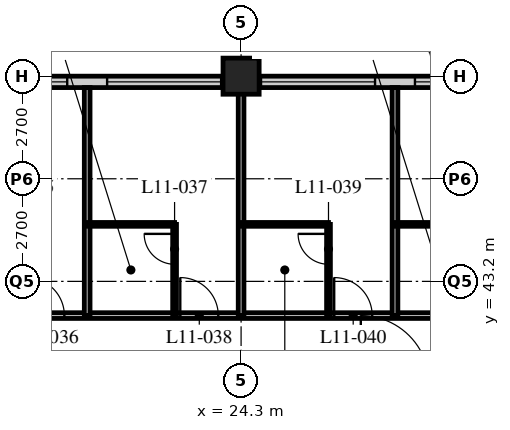
"""IFC4 building model, lengths in metres.
Left out: names, types, materials, properties, quantities, classifications, styles, units other than length and angle.
Written with IfcOpenShell. Run it as: python <this file> out.ifc"""

import sys

from ifc_helpers import new_model, si_unit, direction, frame, frame_2d, origin, origin_2d, place, context, subcontext, project, spatial, rectangle, hollow_rectangle, extrude, element, fill, save


model = new_model("IFC4")
c1 = context("Model", 3, precision=1e-05, world=origin(), true_north=direction((0.0, 1.0)))
c2 = subcontext(c1, "Body", "Model", "MODEL_VIEW")
j1 = project(units=[si_unit("LENGTHUNIT", "METRE"), si_unit("PLANEANGLEUNIT", "RADIAN")], contexts=[c1])
p1 = place(None, origin())
s1 = spatial("IfcSite", under=j1, at=p1, CompositionType="ELEMENT")
p2 = place(p1, origin())
s2 = spatial("IfcBuilding", under=s1, at=p2, CompositionType="ELEMENT")
p3 = place(p2, frame((0.0, 0.0, 50.0)))
s3 = spatial("IfcBuildingStorey", under=s2, at=p3, CompositionType="ELEMENT", Elevation=50.0)
p4 = place(p3, frame((24.3, 48.6, 0.0), z_axis=(0.0, 0.0, 1.0), x_axis=(1.0, 0.0, 0.0)))
e1 = element("IfcColumn", 1, at=p4, inside=s3, PredefinedType="COLUMN", context=c2, shape_type="SweptSolid", body=[
    extrude(hollow_rectangle(XDim=0.95, YDim=0.95, WallThickness=0.095, at=origin_2d()), origin(), (0.0, 0.0, 1.0), 3.4),
])
p5 = place(p3, frame((48.3, 48.45, 0.0), z_axis=(0.0, 0.0, 1.0), x_axis=(-1.0, 0.0, 0.0)))
e2 = element("IfcWall", 2, at=p5, inside=s3, PredefinedType="SOLIDWALL", context=c2, shape_type="SweptSolid", body=[
    extrude(rectangle(XDim=40.2, YDim=0.3, at=frame_2d((20.1, 0.0))), origin(), (0.0, 0.0, 1.0), 3.19),
])
p6 = place(p5, frame((0.225, 0.0, 0.9)))
e3 = element("IfcOpeningElement", 3, at=p6, cuts=e2, PredefinedType="OPENING", context=c2, shape_type="SweptSolid", body=[
    extrude(rectangle(XDim=3.0, YDim=2.0, at=frame_2d((1.5, 1.0))), frame((0.0, 0.16, 0.0), z_axis=(0.0, -1.0, 0.0), x_axis=(1.0, 0.0, 0.0)), (0.0, 0.0, 1.0), 0.32),
])
p7 = place(p5, frame((4.275, 0.0, 0.9)))
e4 = element("IfcOpeningElement", 4, at=p7, cuts=e2, PredefinedType="OPENING", context=c2, shape_type="SweptSolid", body=[
    extrude(rectangle(XDim=3.0, YDim=2.0, at=frame_2d((1.5, 1.0))), frame((0.0, 0.16, 0.0), z_axis=(0.0, -1.0, 0.0), x_axis=(1.0, 0.0, 0.0)), (0.0, 0.0, 1.0), 0.32),
])
p8 = place(p5, frame((8.325, 0.0, 0.9)))
e5 = element("IfcOpeningElement", 5, at=p8, cuts=e2, PredefinedType="OPENING", context=c2, shape_type="SweptSolid", body=[
    extrude(rectangle(XDim=3.0, YDim=2.0, at=frame_2d((1.5, 1.0))), frame((0.0, 0.16, 0.0), z_axis=(0.0, -1.0, 0.0), x_axis=(1.0, 0.0, 0.0)), (0.0, 0.0, 1.0), 0.32),
])
p9 = place(p5, frame((12.375, 0.0, 0.9)))
e6 = element("IfcOpeningElement", 6, at=p9, cuts=e2, PredefinedType="OPENING", context=c2, shape_type="SweptSolid", body=[
    extrude(rectangle(XDim=3.0, YDim=2.0, at=frame_2d((1.5, 1.0))), frame((0.0, 0.16, 0.0), z_axis=(0.0, -1.0, 0.0), x_axis=(1.0, 0.0, 0.0)), (0.0, 0.0, 1.0), 0.32),
])
p10 = place(p5, frame((16.425, 0.0, 0.9)))
e7 = element("IfcOpeningElement", 7, at=p10, cuts=e2, PredefinedType="OPENING", context=c2, shape_type="SweptSolid", body=[
    extrude(rectangle(XDim=3.0, YDim=2.0, at=frame_2d((1.5, 1.0))), frame((0.0, 0.16, 0.0), z_axis=(0.0, -1.0, 0.0), x_axis=(1.0, 0.0, 0.0)), (0.0, 0.0, 1.0), 0.32),
])
p11 = place(p5, frame((20.475, 0.0, 0.9)))
e8 = element("IfcOpeningElement", 8, at=p11, cuts=e2, PredefinedType="OPENING", context=c2, shape_type="SweptSolid", body=[
    extrude(rectangle(XDim=3.0, YDim=2.0, at=frame_2d((1.5, 1.0))), frame((0.0, 0.16, 0.0), z_axis=(0.0, -1.0, 0.0), x_axis=(1.0, 0.0, 0.0)), (0.0, 0.0, 1.0), 0.32),
])
p12 = place(p5, frame((24.525, 0.0, 0.9)))
e9 = element("IfcOpeningElement", 9, at=p12, cuts=e2, PredefinedType="OPENING", context=c2, shape_type="SweptSolid", body=[
    extrude(rectangle(XDim=3.0, YDim=2.0, at=frame_2d((1.5, 1.0))), frame((0.0, 0.16, 0.0), z_axis=(0.0, -1.0, 0.0), x_axis=(1.0, 0.0, 0.0)), (0.0, 0.0, 1.0), 0.32),
])
p13 = place(p5, frame((28.575, 0.0, 0.9)))
e10 = element("IfcOpeningElement", 10, at=p13, cuts=e2, PredefinedType="OPENING", context=c2, shape_type="SweptSolid", body=[
    extrude(rectangle(XDim=3.0, YDim=2.0, at=frame_2d((1.5, 1.0))), frame((0.0, 0.16, 0.0), z_axis=(0.0, -1.0, 0.0), x_axis=(1.0, 0.0, 0.0)), (0.0, 0.0, 1.0), 0.32),
])
p14 = place(p5, frame((32.625, 0.0, 0.9)))
e11 = element("IfcOpeningElement", 11, at=p14, cuts=e2, PredefinedType="OPENING", context=c2, shape_type="SweptSolid", body=[
    extrude(rectangle(XDim=3.0, YDim=2.0, at=frame_2d((1.5, 1.0))), frame((0.0, 0.16, 0.0), z_axis=(0.0, -1.0, 0.0), x_axis=(1.0, 0.0, 0.0)), (0.0, 0.0, 1.0), 0.32),
])
p15 = place(p5, frame((36.675, 0.0, 0.9)))
e12 = element("IfcOpeningElement", 12, at=p15, cuts=e2, PredefinedType="OPENING", context=c2, shape_type="SweptSolid", body=[
    extrude(rectangle(XDim=3.0, YDim=2.0, at=frame_2d((1.5, 1.0))), frame((0.0, 0.16, 0.0), z_axis=(0.0, -1.0, 0.0), x_axis=(1.0, 0.0, 0.0)), (0.0, 0.0, 1.0), 0.32),
])
p16 = place(p3, frame((8.1, 42.3, 0.0), z_axis=(0.0, 0.0, 1.0), x_axis=(1.0, 0.0, 0.0)))
e13 = element("IfcWall", 13, at=p16, inside=s3, PredefinedType="PARTITIONING", context=c2, shape_type="SweptSolid", body=[
    extrude(rectangle(XDim=40.5, YDim=0.15, at=frame_2d((20.25, 0.0))), origin(), (0.0, 0.0, 1.0), 3.19),
])
p17 = place(p16, frame((6.5, 0.0, 0.0)))
e14 = element("IfcOpeningElement", 14, at=p17, cuts=e13, PredefinedType="OPENING", context=c2, shape_type="SweptSolid", body=[
    extrude(rectangle(XDim=1.0, YDim=2.1, at=frame_2d((0.5, 1.05))), frame((0.0, 0.085, 0.0), z_axis=(0.0, -1.0, 0.0), x_axis=(1.0, 0.0, 0.0)), (0.0, 0.0, 1.0), 0.17),
])
p18 = place(p16, frame((10.55, 0.0, 0.0)))
e15 = element("IfcOpeningElement", 15, at=p18, cuts=e13, PredefinedType="OPENING", context=c2, shape_type="SweptSolid", body=[
    extrude(rectangle(XDim=1.0, YDim=2.1, at=frame_2d((0.5, 1.05))), frame((0.0, 0.085, 0.0), z_axis=(0.0, -1.0, 0.0), x_axis=(1.0, 0.0, 0.0)), (0.0, 0.0, 1.0), 0.17),
])
p19 = place(p16, frame((14.6, 0.0, 0.0)))
e16 = element("IfcOpeningElement", 16, at=p19, cuts=e13, PredefinedType="OPENING", context=c2, shape_type="SweptSolid", body=[
    extrude(rectangle(XDim=1.0, YDim=2.1, at=frame_2d((0.5, 1.05))), frame((0.0, 0.085, 0.0), z_axis=(0.0, -1.0, 0.0), x_axis=(1.0, 0.0, 0.0)), (0.0, 0.0, 1.0), 0.17),
])
p20 = place(p16, frame((18.65, 0.0, 0.0)))
e17 = element("IfcOpeningElement", 17, at=p20, cuts=e13, PredefinedType="OPENING", context=c2, shape_type="SweptSolid", body=[
    extrude(rectangle(XDim=1.0, YDim=2.1, at=frame_2d((0.5, 1.05))), frame((0.0, 0.085, 0.0), z_axis=(0.0, -1.0, 0.0), x_axis=(1.0, 0.0, 0.0)), (0.0, 0.0, 1.0), 0.17),
])
p21 = place(p16, frame((22.7, 0.0, 0.0)))
e18 = element("IfcOpeningElement", 18, at=p21, cuts=e13, PredefinedType="OPENING", context=c2, shape_type="SweptSolid", body=[
    extrude(rectangle(XDim=1.0, YDim=2.1, at=frame_2d((0.5, 1.05))), frame((0.0, 0.085, 0.0), z_axis=(0.0, -1.0, 0.0), x_axis=(1.0, 0.0, 0.0)), (0.0, 0.0, 1.0), 0.17),
])
p22 = place(p16, frame((26.75, 0.0, 0.0)))
e19 = element("IfcOpeningElement", 19, at=p22, cuts=e13, PredefinedType="OPENING", context=c2, shape_type="SweptSolid", body=[
    extrude(rectangle(XDim=1.0, YDim=2.1, at=frame_2d((0.5, 1.05))), frame((0.0, 0.085, 0.0), z_axis=(0.0, -1.0, 0.0), x_axis=(1.0, 0.0, 0.0)), (0.0, 0.0, 1.0), 0.17),
])
p23 = place(p16, frame((30.8, 0.0, 0.0)))
e20 = element("IfcOpeningElement", 20, at=p23, cuts=e13, PredefinedType="OPENING", context=c2, shape_type="SweptSolid", body=[
    extrude(rectangle(XDim=1.0, YDim=2.1, at=frame_2d((0.5, 1.05))), frame((0.0, 0.085, 0.0), z_axis=(0.0, -1.0, 0.0), x_axis=(1.0, 0.0, 0.0)), (0.0, 0.0, 1.0), 0.17),
])
p24 = place(p16, frame((34.85, 0.0, 0.0)))
e21 = element("IfcOpeningElement", 21, at=p24, cuts=e13, PredefinedType="OPENING", context=c2, shape_type="SweptSolid", body=[
    extrude(rectangle(XDim=1.0, YDim=2.1, at=frame_2d((0.5, 1.05))), frame((0.0, 0.085, 0.0), z_axis=(0.0, -1.0, 0.0), x_axis=(1.0, 0.0, 0.0)), (0.0, 0.0, 1.0), 0.17),
])
p25 = place(p16, frame((36.875, 0.0, 0.0)))
e22 = element("IfcOpeningElement", 22, at=p25, cuts=e13, PredefinedType="OPENING", context=c2, shape_type="SweptSolid", body=[
    extrude(rectangle(XDim=1.0, YDim=2.1, at=frame_2d((0.5, 1.05))), frame((0.0, 0.085, 0.0), z_axis=(0.0, -1.0, 0.0), x_axis=(1.0, 0.0, 0.0)), (0.0, 0.0, 1.0), 0.17),
])
p26 = place(p16, frame((2.625, 0.0, 0.0)))
e23 = element("IfcOpeningElement", 23, at=p26, cuts=e13, PredefinedType="OPENING", context=c2, shape_type="SweptSolid", body=[
    extrude(rectangle(XDim=1.0, YDim=2.1, at=frame_2d((0.5, 1.05))), frame((0.0, 0.085, 0.0), z_axis=(0.0, -1.0, 0.0), x_axis=(1.0, 0.0, 0.0)), (0.0, 0.0, 1.0), 0.17),
])
p27 = place(p3, frame((20.25, 42.3, 0.0), z_axis=(0.0, 0.0, 1.0), x_axis=(0.0, 1.0, 0.0)))
e24 = element("IfcWall", 24, at=p27, inside=s3, PredefinedType="PARTITIONING", context=c2, shape_type="SweptSolid", body=[
    extrude(rectangle(XDim=6.0, YDim=0.15, at=frame_2d((3.0, 0.0))), origin(), (0.0, 0.0, 1.0), 3.19),
])
p28 = place(p3, frame((20.25, 44.7, 0.0), z_axis=(0.0, 0.0, 1.0), x_axis=(1.0, 0.0, 0.0)))
e25 = element("IfcWall", 25, at=p28, inside=s3, PredefinedType="PARTITIONING", context=c2, shape_type="SweptSolid", body=[
    extrude(rectangle(XDim=2.3, YDim=0.1, at=frame_2d((1.15, 0.0))), origin(), (0.0, 0.0, 1.0), 3.19),
])
p29 = place(p3, frame((22.55, 42.3, 0.0), z_axis=(0.0, 0.0, 1.0), x_axis=(0.0, 1.0, 0.0)))
e26 = element("IfcWall", 26, at=p29, inside=s3, PredefinedType="PARTITIONING", context=c2, shape_type="SweptSolid", body=[
    extrude(rectangle(XDim=2.4, YDim=0.1, at=frame_2d((1.2, 0.0))), origin(), (0.0, 0.0, 1.0), 3.19),
])
p30 = place(p29, frame((1.35, 0.0, 0.0)))
e27 = element("IfcOpeningElement", 27, at=p30, cuts=e26, PredefinedType="OPENING", context=c2, shape_type="SweptSolid", body=[
    extrude(rectangle(XDim=0.8, YDim=2.1, at=frame_2d((0.4, 1.05))), frame((0.0, 0.06, 0.0), z_axis=(0.0, -1.0, 0.0), x_axis=(1.0, 0.0, 0.0)), (0.0, 0.0, 1.0), 0.12),
])
p31 = place(p3, frame((24.3, 42.3, 0.0), z_axis=(0.0, 0.0, 1.0), x_axis=(0.0, 1.0, 0.0)))
e28 = element("IfcWall", 28, at=p31, inside=s3, PredefinedType="PARTITIONING", context=c2, shape_type="SweptSolid", body=[
    extrude(rectangle(XDim=6.0, YDim=0.15, at=frame_2d((3.0, 0.0))), origin(), (0.0, 0.0, 1.0), 2.578),
])
p32 = place(p3, frame((24.3, 44.7, 0.0), z_axis=(0.0, 0.0, 1.0), x_axis=(1.0, 0.0, 0.0)))
e29 = element("IfcWall", 29, at=p32, inside=s3, PredefinedType="PARTITIONING", context=c2, shape_type="SweptSolid", body=[
    extrude(rectangle(XDim=2.3, YDim=0.1, at=frame_2d((1.15, 0.0))), origin(), (0.0, 0.0, 1.0), 3.19),
])
p33 = place(p3, frame((26.6, 42.3, 0.0), z_axis=(0.0, 0.0, 1.0), x_axis=(0.0, 1.0, 0.0)))
e30 = element("IfcWall", 30, at=p33, inside=s3, PredefinedType="PARTITIONING", context=c2, shape_type="SweptSolid", body=[
    extrude(rectangle(XDim=2.4, YDim=0.1, at=frame_2d((1.2, 0.0))), origin(), (0.0, 0.0, 1.0), 3.19),
])
p34 = place(p33, frame((1.35, 0.0, 0.0)))
e31 = element("IfcOpeningElement", 31, at=p34, cuts=e30, PredefinedType="OPENING", context=c2, shape_type="SweptSolid", body=[
    extrude(rectangle(XDim=0.8, YDim=2.1, at=frame_2d((0.4, 1.05))), frame((0.0, 0.06, 0.0), z_axis=(0.0, -1.0, 0.0), x_axis=(1.0, 0.0, 0.0)), (0.0, 0.0, 1.0), 0.12),
])
p35 = place(p3, frame((28.35, 42.3, 0.0), z_axis=(0.0, 0.0, 1.0), x_axis=(0.0, 1.0, 0.0)))
e32 = element("IfcWall", 32, at=p35, inside=s3, PredefinedType="PARTITIONING", context=c2, shape_type="SweptSolid", body=[
    extrude(rectangle(XDim=6.0, YDim=0.15, at=frame_2d((3.0, 0.0))), origin(), (0.0, 0.0, 1.0), 3.19),
])
p36 = place(p3, frame((28.35, 44.7, 0.0), z_axis=(0.0, 0.0, 1.0), x_axis=(1.0, 0.0, 0.0)))
e33 = element("IfcWall", 33, at=p36, inside=s3, PredefinedType="PARTITIONING", context=c2, shape_type="SweptSolid", body=[
    extrude(rectangle(XDim=2.3, YDim=0.1, at=frame_2d((1.15, 0.0))), origin(), (0.0, 0.0, 1.0), 3.19),
])
p37 = place(p10, origin())
e34 = element("IfcWindow", 34, at=p37, inside=s3, PartitioningType="SINGLE_PANEL", PredefinedType="WINDOW", context=c2, shape_type="SweptSolid", body=[
    extrude(rectangle(XDim=3.0, YDim=2.0, at=frame_2d((1.5, 1.0))), frame((0.0, 0.03, 0.0), z_axis=(0.0, -1.0, 0.0), x_axis=(1.0, 0.0, 0.0)), (0.0, 0.0, 1.0), 0.06),
])
fill(e7, e34)
p38 = place(p11, origin())
e35 = element("IfcWindow", 35, at=p38, inside=s3, PartitioningType="SINGLE_PANEL", PredefinedType="WINDOW", context=c2, shape_type="SweptSolid", body=[
    extrude(rectangle(XDim=3.0, YDim=2.0, at=frame_2d((1.5, 1.0))), frame((0.0, 0.03, 0.0), z_axis=(0.0, -1.0, 0.0), x_axis=(1.0, 0.0, 0.0)), (0.0, 0.0, 1.0), 0.06),
])
fill(e8, e35)
p39 = place(p12, origin())
e36 = element("IfcWindow", 36, at=p39, inside=s3, PartitioningType="SINGLE_PANEL", PredefinedType="WINDOW", context=c2, shape_type="SweptSolid", body=[
    extrude(rectangle(XDim=3.0, YDim=2.0, at=frame_2d((1.5, 1.0))), frame((0.0, 0.03, 0.0), z_axis=(0.0, -1.0, 0.0), x_axis=(1.0, 0.0, 0.0)), (0.0, 0.0, 1.0), 0.06),
])
fill(e9, e36)
p40 = place(p13, origin())
e37 = element("IfcWindow", 37, at=p40, inside=s3, PartitioningType="SINGLE_PANEL", PredefinedType="WINDOW", context=c2, shape_type="SweptSolid", body=[
    extrude(rectangle(XDim=3.0, YDim=2.0, at=frame_2d((1.5, 1.0))), frame((0.0, 0.03, 0.0), z_axis=(0.0, -1.0, 0.0), x_axis=(1.0, 0.0, 0.0)), (0.0, 0.0, 1.0), 0.06),
])
fill(e10, e37)
p41 = place(p18, origin())
e38 = element("IfcDoor", 38, at=p41, inside=s3, OperationType="SINGLE_SWING_LEFT", PredefinedType="DOOR", context=c2, shape_type="SweptSolid", body=[
    extrude(rectangle(XDim=1.0, YDim=2.1, at=frame_2d((0.5, 1.05))), frame((0.0, 0.025, 0.0), z_axis=(0.0, -1.0, 0.0), x_axis=(1.0, 0.0, 0.0)), (0.0, 0.0, 1.0), 0.05),
])
fill(e15, e38)
p42 = place(p30, origin())
e39 = element("IfcDoor", 39, at=p42, inside=s3, OperationType="SINGLE_SWING_RIGHT", PredefinedType="DOOR", context=c2, shape_type="SweptSolid", body=[
    extrude(rectangle(XDim=0.8, YDim=2.1, at=frame_2d((0.4, 1.05))), frame((0.0, 0.025, 0.0), z_axis=(0.0, -1.0, 0.0), x_axis=(1.0, 0.0, 0.0)), (0.0, 0.0, 1.0), 0.05),
])
fill(e27, e39)
p43 = place(p19, origin())
e40 = element("IfcDoor", 40, at=p43, inside=s3, OperationType="SINGLE_SWING_LEFT", PredefinedType="DOOR", context=c2, shape_type="SweptSolid", body=[
    extrude(rectangle(XDim=1.0, YDim=2.1, at=frame_2d((0.5, 1.05))), frame((0.0, 0.025, 0.0), z_axis=(0.0, -1.0, 0.0), x_axis=(1.0, 0.0, 0.0)), (0.0, 0.0, 1.0), 0.05),
])
fill(e16, e40)
p44 = place(p34, origin())
e41 = element("IfcDoor", 41, at=p44, inside=s3, OperationType="SINGLE_SWING_RIGHT", PredefinedType="DOOR", context=c2, shape_type="SweptSolid", body=[
    extrude(rectangle(XDim=0.8, YDim=2.1, at=frame_2d((0.4, 1.05))), frame((0.0, 0.025, 0.0), z_axis=(0.0, -1.0, 0.0), x_axis=(1.0, 0.0, 0.0)), (0.0, 0.0, 1.0), 0.05),
])
fill(e31, e41)
p45 = place(p20, origin())
e42 = element("IfcDoor", 42, at=p45, inside=s3, OperationType="SINGLE_SWING_LEFT", PredefinedType="DOOR", context=c2, shape_type="SweptSolid", body=[
    extrude(rectangle(XDim=1.0, YDim=2.1, at=frame_2d((0.5, 1.05))), frame((0.0, 0.025, 0.0), z_axis=(0.0, -1.0, 0.0), x_axis=(1.0, 0.0, 0.0)), (0.0, 0.0, 1.0), 0.05),
])
fill(e17, e42)
save(model, sys.argv[1])
